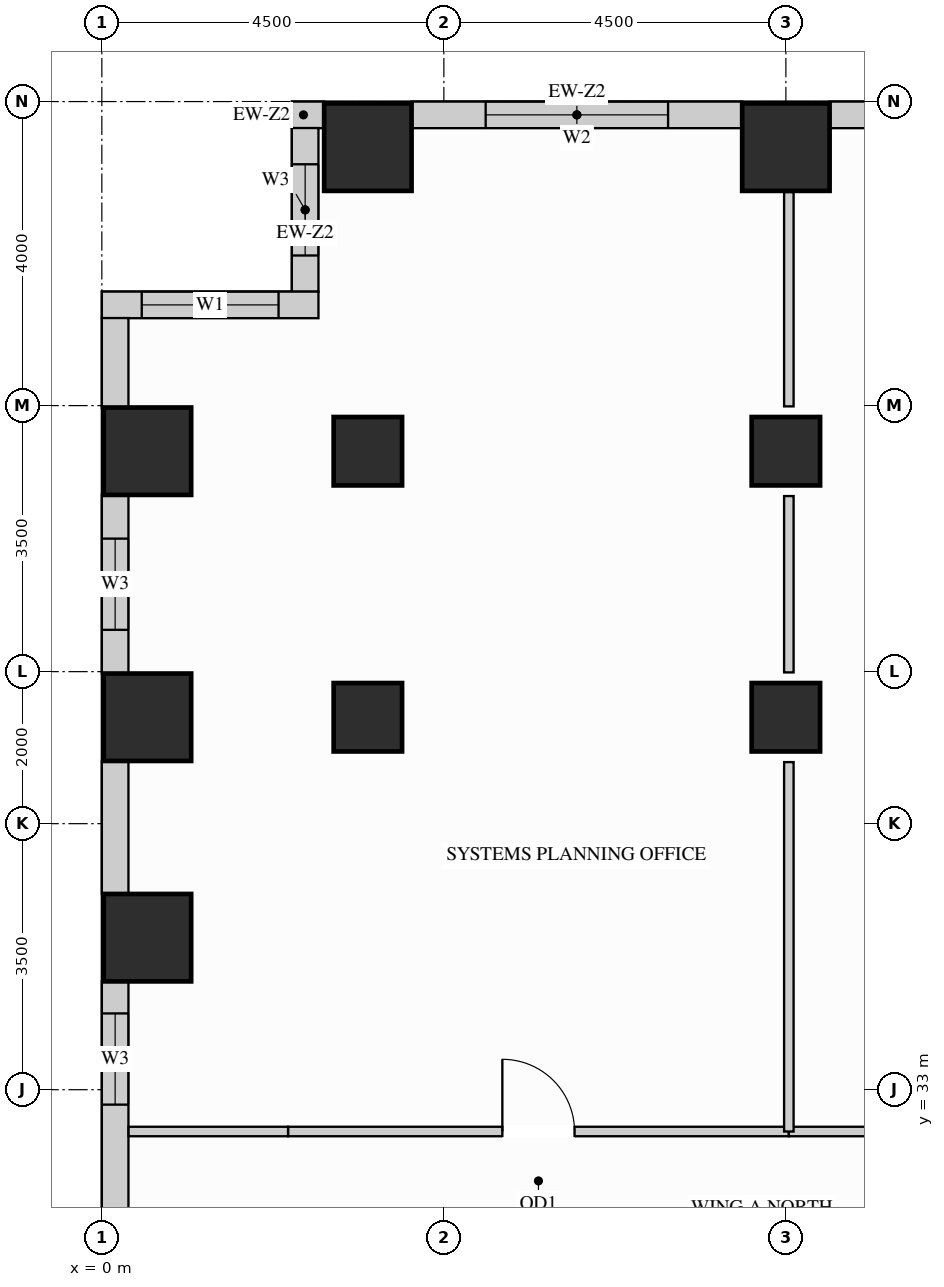
"""IFC4 building model, lengths in metres.
Left out: names, types, materials, properties, quantities, classifications, styles, units other than length and angle.
Written with IfcOpenShell. Run it as: python <this file> out.ifc"""

import sys

from ifc_helpers import new_model, si_unit, direction, frame, frame_2d, origin, origin_2d, place, context, subcontext, project, spatial, rectangle, extrude, source, transform, mapped, element, fill, save


model = new_model("IFC4")
c1 = context("Model", 3, precision=1e-05, world=origin(), true_north=direction((0.0, 1.0)))
c2 = subcontext(c1, "Body", "Model", "MODEL_VIEW")
j1 = project(units=[si_unit("LENGTHUNIT", "METRE"), si_unit("PLANEANGLEUNIT", "RADIAN")], contexts=[c1])
p1 = place(None, origin())
s1 = spatial("IfcSite", under=j1, at=p1, CompositionType="ELEMENT")
p2 = place(p1, origin())
s2 = spatial("IfcBuilding", under=s1, at=p2, CompositionType="ELEMENT")
p3 = place(p2, frame((0.0, 0.0, 131.4)))
s3 = spatial("IfcBuildingStorey", under=s2, at=p3, CompositionType="ELEMENT", Elevation=131.4)
m1 = source(origin(), c2, "Body", "SweptSolid", [
    extrude(rectangle(XDim=0.9, YDim=0.9, at=origin_2d()), origin(), (0.0, 0.0, 1.0), 3.38),
])
for number, where, z_axis, x_axis in (
    (1, (3.5, 37.9, 0.0), (0.0, 0.0, 1.0), (1.0, 0.0, 0.0)),
    (2, (3.5, 41.4, 0.0), (0.0, 0.0, 1.0), (1.0, 0.0, 0.0)),
    (3, (9.0, 37.9, 0.0), (0.0, 0.0, 1.0), (1.0, 0.0, 0.0)),
    (4, (9.0, 41.4, 0.0), (0.0, 0.0, 1.0), (1.0, 0.0, 0.0)),
):
    element("IfcColumn", number, at=place(p3, frame(where, z_axis=z_axis, x_axis=x_axis)), inside=s3, PredefinedType="COLUMN", context=c2, shape_type="MappedRepresentation", body=[
        mapped(m1, transform((0.0, 0.0, 0.0), x_axis=(1.0, 0.0, 0.0), y_axis=(0.0, 1.0, 0.0), z_axis=(0.0, 0.0, 1.0))),
    ])
m2 = source(origin(), c2, "Body", "SweptSolid", [
    extrude(rectangle(XDim=1.15, YDim=1.15, at=origin_2d()), origin(), (0.0, 0.0, 1.0), 3.38),
])
for number, where, z_axis, x_axis in (
    (5, (3.5, 45.4, 0.0), (0.0, 0.0, 1.0), (1.0, 0.0, 0.0)),
    (6, (9.0, 45.4, 0.0), (0.0, 0.0, 1.0), (1.0, 0.0, 0.0)),
    (7, (0.6, 35.0, 0.0), (0.0, 0.0, 1.0), (1.0, 0.0, 0.0)),
    (8, (0.6, 37.9, 0.0), (0.0, 0.0, 1.0), (1.0, 0.0, 0.0)),
    (9, (0.6, 41.4, 0.0), (0.0, 0.0, 1.0), (1.0, 0.0, 0.0)),
):
    element("IfcColumn", number, at=place(p3, frame(where, z_axis=z_axis, x_axis=x_axis)), inside=s3, PredefinedType="COLUMN", context=c2, shape_type="MappedRepresentation", body=[
        mapped(m2, transform((0.0, 0.0, 0.0), x_axis=(1.0, 0.0, 0.0), y_axis=(0.0, 1.0, 0.0), z_axis=(0.0, 0.0, 1.0))),
    ])
p4 = place(p3, frame((13.927, 45.825, 0.0), z_axis=(0.0, 0.0, 1.0), x_axis=(-1.0, 0.0, 0.0)))
e10 = element("IfcWall", 10, at=p4, inside=s3, PredefinedType="SOLIDWALL", context=c2, shape_type="SweptSolid", body=[
    extrude(rectangle(XDim=4.354, YDim=0.35, at=frame_2d((2.177, 0.0))), origin(), (0.0, 0.0, 1.0), 3.365),
])
p5 = place(p4, frame((0.977, 0.0, 0.78)))
e11 = element("IfcOpeningElement", 11, at=p5, cuts=e10, PredefinedType="OPENING", context=c2, shape_type="SweptSolid", body=[
    extrude(rectangle(XDim=2.4, YDim=2.1, at=frame_2d((1.2, 1.05))), frame((0.0, 0.185, 0.0), z_axis=(0.0, -1.0, 0.0), x_axis=(1.0, 0.0, 0.0)), (0.0, 0.0, 1.0), 0.37),
])
p6 = place(p3, frame((8.427, 45.825, 0.0), z_axis=(0.0, 0.0, 1.0), x_axis=(-1.0, 0.0, 0.0)))
e12 = element("IfcWall", 12, at=p6, inside=s3, PredefinedType="SOLIDWALL", context=c2, shape_type="SweptSolid", body=[
    extrude(rectangle(XDim=4.354, YDim=0.35, at=frame_2d((2.177, 0.0))), origin(), (0.0, 0.0, 1.0), 3.365),
])
p7 = place(p6, frame((0.977, 0.0, 0.78)))
e13 = element("IfcOpeningElement", 13, at=p7, cuts=e12, PredefinedType="OPENING", context=c2, shape_type="SweptSolid", body=[
    extrude(rectangle(XDim=2.4, YDim=2.1, at=frame_2d((1.2, 1.05))), frame((0.0, 0.185, 0.0), z_axis=(0.0, -1.0, 0.0), x_axis=(1.0, 0.0, 0.0)), (0.0, 0.0, 1.0), 0.37),
])
m3 = source(origin(), c2, "Body", "SweptSolid", [
    extrude(rectangle(XDim=0.427, YDim=0.35, at=frame_2d((0.213, 0.0))), origin(), (0.0, 0.0, 1.0), 3.365),
])
p8 = place(p3, frame((2.927, 45.825, 0.0), z_axis=(0.0, 0.0, 1.0), x_axis=(-1.0, 0.0, 0.0)))
e14 = element("IfcWall", 14, at=p8, inside=s3, PredefinedType="SOLIDWALL", context=c2, shape_type="MappedRepresentation", body=[
    mapped(m3, transform((0.0, 0.0, 0.0), x_axis=(1.0, 0.0, 0.0), y_axis=(0.0, 1.0, 0.0), z_axis=(0.0, 0.0, 1.0))),
])
p9 = place(p3, frame((2.675, 45.652, 0.0), z_axis=(0.0, 0.0, 1.0), x_axis=(0.0, -1.0, 0.0)))
e15 = element("IfcWall", 15, at=p9, inside=s3, PredefinedType="SOLIDWALL", context=c2, shape_type="SweptSolid", body=[
    extrude(rectangle(XDim=2.154, YDim=0.35, at=frame_2d((1.077, 0.0))), origin(), (0.0, 0.0, 1.0), 3.365),
])
p10 = place(p9, frame((0.477, 0.0, 0.78)))
e16 = element("IfcOpeningElement", 16, at=p10, cuts=e15, PredefinedType="OPENING", context=c2, shape_type="SweptSolid", body=[
    extrude(rectangle(XDim=1.2, YDim=2.1, at=frame_2d((0.6, 1.05))), frame((0.0, 0.185, 0.0), z_axis=(0.0, -1.0, 0.0), x_axis=(1.0, 0.0, 0.0)), (0.0, 0.0, 1.0), 0.37),
])
p11 = place(p3, frame((2.85, 43.325, 0.0), z_axis=(0.0, 0.0, 1.0), x_axis=(-1.0, 0.0, 0.0)))
e17 = element("IfcWall", 17, at=p11, inside=s3, PredefinedType="SOLIDWALL", context=c2, shape_type="SweptSolid", body=[
    extrude(rectangle(XDim=2.85, YDim=0.35, at=frame_2d((1.425, 0.0))), origin(), (0.0, 0.0, 1.0), 3.365),
])
p12 = place(p11, frame((0.525, 0.0, 0.78)))
e18 = element("IfcOpeningElement", 18, at=p12, cuts=e17, PredefinedType="OPENING", context=c2, shape_type="SweptSolid", body=[
    extrude(rectangle(XDim=1.8, YDim=2.1, at=frame_2d((0.9, 1.05))), frame((0.0, 0.185, 0.0), z_axis=(0.0, -1.0, 0.0), x_axis=(1.0, 0.0, 0.0)), (0.0, 0.0, 1.0), 0.37),
])
m4 = source(origin(), c2, "Body", "SweptSolid", [
    extrude(rectangle(XDim=1.179, YDim=0.35, at=frame_2d((0.59, 0.0))), origin(), (0.0, 0.0, 1.0), 3.365),
])
p13 = place(p3, frame((0.175, 43.152, 0.0), z_axis=(0.0, 0.0, 1.0), x_axis=(0.0, -1.0, 0.0)))
e19 = element("IfcWall", 19, at=p13, inside=s3, PredefinedType="SOLIDWALL", context=c2, shape_type="MappedRepresentation", body=[
    mapped(m4, transform((0.0, 0.0, 0.0), x_axis=(1.0, 0.0, 0.0), y_axis=(0.0, 1.0, 0.0), z_axis=(0.0, 0.0, 1.0))),
])
p14 = place(p3, frame((0.175, 40.827, 0.0), z_axis=(0.0, 0.0, 1.0), x_axis=(0.0, -1.0, 0.0)))
e20 = element("IfcWall", 20, at=p14, inside=s3, PredefinedType="SOLIDWALL", context=c2, shape_type="SweptSolid", body=[
    extrude(rectangle(XDim=2.354, YDim=0.35, at=frame_2d((1.177, 0.0))), origin(), (0.0, 0.0, 1.0), 3.365),
])
p15 = place(p14, frame((0.577, 0.0, 0.78)))
e21 = element("IfcOpeningElement", 21, at=p15, cuts=e20, PredefinedType="OPENING", context=c2, shape_type="SweptSolid", body=[
    extrude(rectangle(XDim=1.2, YDim=2.1, at=frame_2d((0.6, 1.05))), frame((0.0, 0.185, 0.0), z_axis=(0.0, -1.0, 0.0), x_axis=(1.0, 0.0, 0.0)), (0.0, 0.0, 1.0), 0.37),
])
m5 = source(origin(), c2, "Body", "SweptSolid", [
    extrude(rectangle(XDim=1.754, YDim=0.35, at=frame_2d((0.877, 0.0))), origin(), (0.0, 0.0, 1.0), 3.365),
])
p16 = place(p3, frame((0.175, 37.327, 0.0), z_axis=(0.0, 0.0, 1.0), x_axis=(0.0, -1.0, 0.0)))
e22 = element("IfcWall", 22, at=p16, inside=s3, PredefinedType="SOLIDWALL", context=c2, shape_type="MappedRepresentation", body=[
    mapped(m5, transform((0.0, 0.0, 0.0), x_axis=(1.0, 0.0, 0.0), y_axis=(0.0, 1.0, 0.0), z_axis=(0.0, 0.0, 1.0))),
])
p17 = place(p3, frame((0.175, 34.427, 0.0), z_axis=(0.0, 0.0, 1.0), x_axis=(0.0, -1.0, 0.0)))
e23 = element("IfcWall", 23, at=p17, inside=s3, PredefinedType="SOLIDWALL", context=c2, shape_type="SweptSolid", body=[
    extrude(rectangle(XDim=3.354, YDim=0.35, at=frame_2d((1.677, 0.0))), origin(), (0.0, 0.0, 1.0), 3.365),
])
p18 = place(p17, frame((0.424, 0.0, 0.78)))
e24 = element("IfcOpeningElement", 24, at=p18, cuts=e23, PredefinedType="OPENING", context=c2, shape_type="SweptSolid", body=[
    extrude(rectangle(XDim=1.2, YDim=2.1, at=frame_2d((0.6, 1.05))), frame((0.0, 0.185, 0.0), z_axis=(0.0, -1.0, 0.0), x_axis=(1.0, 0.0, 0.0)), (0.0, 0.0, 1.0), 0.37),
])
p19 = place(p3, frame((2.45, 32.45, 0.0), z_axis=(0.0, 0.0, 1.0), x_axis=(1.0, 0.0, 0.0)))
e25 = element("IfcWall", 25, at=p19, inside=s3, PredefinedType="PARTITIONING", context=c2, shape_type="SweptSolid", body=[
    extrude(rectangle(XDim=6.589, YDim=0.125, at=frame_2d((3.294, 0.0))), origin(), (0.0, 0.0, 1.0), 3.365),
])
p20 = place(p19, frame((2.82, 0.0, 0.0)))
e26 = element("IfcOpeningElement", 26, at=p20, cuts=e25, PredefinedType="OPENING", context=c2, shape_type="SweptSolid", body=[
    extrude(rectangle(XDim=0.95, YDim=2.15, at=frame_2d((0.475, 1.075))), frame((0.0, 0.073, 0.0), z_axis=(0.0, -1.0, 0.0), x_axis=(1.0, 0.0, 0.0)), (0.0, 0.0, 1.0), 0.145),
])
p21 = place(p3, frame((9.039, 32.45, 0.0), z_axis=(0.0, 0.0, 1.0), x_axis=(1.0, 0.0, 0.0)))
e27 = element("IfcWall", 27, at=p21, inside=s3, PredefinedType="PARTITIONING", context=c2, shape_type="SweptSolid", body=[
    extrude(rectangle(XDim=8.011, YDim=0.125, at=frame_2d((4.005, 0.0))), origin(), (0.0, 0.0, 1.0), 3.365),
])
p22 = place(p21, frame((3.531, 0.0, 0.0)))
e28 = element("IfcOpeningElement", 28, at=p22, cuts=e27, PredefinedType="OPENING", context=c2, shape_type="SweptSolid", body=[
    extrude(rectangle(XDim=0.95, YDim=2.15, at=frame_2d((0.475, 1.075))), frame((0.0, 0.073, 0.0), z_axis=(0.0, -1.0, 0.0), x_axis=(1.0, 0.0, 0.0)), (0.0, 0.0, 1.0), 0.145),
])
m6 = source(origin(), c2, "Body", "SweptSolid", [
    extrude(rectangle(XDim=2.098, YDim=0.125, at=frame_2d((1.049, 0.0))), origin(), (0.0, 0.0, 1.0), 3.365),
])
p23 = place(p3, frame((0.352, 32.45, 0.0), z_axis=(0.0, 0.0, 1.0), x_axis=(1.0, 0.0, 0.0)))
e29 = element("IfcWall", 29, at=p23, inside=s3, PredefinedType="PARTITIONING", context=c2, shape_type="MappedRepresentation", body=[
    mapped(m6, transform((0.0, 0.0, 0.0), x_axis=(1.0, 0.0, 0.0), y_axis=(0.0, 1.0, 0.0), z_axis=(0.0, 0.0, 1.0))),
])
m7 = source(origin(), c2, "Body", "SweptSolid", [
    extrude(rectangle(XDim=4.86, YDim=0.125, at=frame_2d((2.43, 0.0))), origin(), (0.0, 0.0, 1.0), 3.365),
])
p24 = place(p3, frame((9.039, 32.45, 0.0), z_axis=(0.0, 0.0, 1.0), x_axis=(0.0, 1.0, 0.0)))
e30 = element("IfcWall", 30, at=p24, inside=s3, PredefinedType="PARTITIONING", context=c2, shape_type="MappedRepresentation", body=[
    mapped(m7, transform((0.0, 0.0, 0.0), x_axis=(1.0, 0.0, 0.0), y_axis=(0.0, 1.0, 0.0), z_axis=(0.0, 0.0, 1.0))),
])
m8 = source(origin(), c2, "Body", "SweptSolid", [
    extrude(rectangle(XDim=2.32, YDim=0.125, at=frame_2d((1.16, 0.0))), origin(), (0.0, 0.0, 1.0), 2.677),
])
p25 = place(p3, frame((9.039, 38.49, 0.0), z_axis=(0.0, 0.0, 1.0), x_axis=(0.0, 1.0, 0.0)))
e31 = element("IfcWall", 31, at=p25, inside=s3, PredefinedType="PARTITIONING", context=c2, shape_type="MappedRepresentation", body=[
    mapped(m8, transform((0.0, 0.0, 0.0), x_axis=(1.0, 0.0, 0.0), y_axis=(0.0, 1.0, 0.0), z_axis=(0.0, 0.0, 1.0))),
])
m9 = source(origin(), c2, "Body", "SweptSolid", [
    extrude(rectangle(XDim=2.82, YDim=0.125, at=frame_2d((1.41, 0.0))), origin(), (0.0, 0.0, 1.0), 2.677),
])
p26 = place(p3, frame((9.039, 41.99, 0.0), z_axis=(0.0, 0.0, 1.0), x_axis=(0.0, 1.0, 0.0)))
e32 = element("IfcWall", 32, at=p26, inside=s3, PredefinedType="PARTITIONING", context=c2, shape_type="MappedRepresentation", body=[
    mapped(m9, transform((0.0, 0.0, 0.0), x_axis=(1.0, 0.0, 0.0), y_axis=(0.0, 1.0, 0.0), z_axis=(0.0, 0.0, 1.0))),
])
m10 = source(origin(), c2, "Body", "SweptSolid", [
    extrude(rectangle(XDim=0.95, YDim=2.15, at=frame_2d((0.475, 1.075))), frame((0.0, 0.025, 0.0), z_axis=(0.0, -1.0, 0.0), x_axis=(1.0, 0.0, 0.0)), (0.0, 0.0, 1.0), 0.05),
])
p27 = place(p20, origin())
e33 = element("IfcDoor", 33, at=p27, inside=s3, OperationType="SINGLE_SWING_LEFT", PredefinedType="DOOR", context=c2, shape_type="MappedRepresentation", body=[
    mapped(m10, transform((0.0, 0.0, 0.0), x_axis=(1.0, 0.0, 0.0), y_axis=(0.0, 1.0, 0.0), z_axis=(0.0, 0.0, 1.0))),
])
fill(e26, e33)
m11 = source(origin(), c2, "Body", "SweptSolid", [
    extrude(rectangle(XDim=1.8, YDim=2.1, at=frame_2d((0.9, 1.05))), frame((0.0, 0.03, 0.0), z_axis=(0.0, -1.0, 0.0), x_axis=(1.0, 0.0, 0.0)), (0.0, 0.0, 1.0), 0.06),
])
p28 = place(p12, origin())
e34 = element("IfcWindow", 34, at=p28, inside=s3, PartitioningType="SINGLE_PANEL", PredefinedType="WINDOW", context=c2, shape_type="MappedRepresentation", body=[
    mapped(m11, transform((0.0, 0.0, 0.0), x_axis=(1.0, 0.0, 0.0), y_axis=(0.0, 1.0, 0.0), z_axis=(0.0, 0.0, 1.0))),
])
fill(e18, e34)
m12 = source(origin(), c2, "Body", "SweptSolid", [
    extrude(rectangle(XDim=2.4, YDim=2.1, at=frame_2d((1.2, 1.05))), frame((0.0, 0.03, 0.0), z_axis=(0.0, -1.0, 0.0), x_axis=(1.0, 0.0, 0.0)), (0.0, 0.0, 1.0), 0.06),
])
p29 = place(p7, origin())
e35 = element("IfcWindow", 35, at=p29, inside=s3, PartitioningType="SINGLE_PANEL", PredefinedType="WINDOW", context=c2, shape_type="MappedRepresentation", body=[
    mapped(m12, transform((0.0, 0.0, 0.0), x_axis=(1.0, 0.0, 0.0), y_axis=(0.0, 1.0, 0.0), z_axis=(0.0, 0.0, 1.0))),
])
fill(e13, e35)
m13 = source(origin(), c2, "Body", "SweptSolid", [
    extrude(rectangle(XDim=1.2, YDim=2.1, at=frame_2d((0.6, 1.05))), frame((0.0, 0.03, 0.0), z_axis=(0.0, -1.0, 0.0), x_axis=(1.0, 0.0, 0.0)), (0.0, 0.0, 1.0), 0.06),
])
p30 = place(p10, origin())
e36 = element("IfcWindow", 36, at=p30, inside=s3, PartitioningType="SINGLE_PANEL", PredefinedType="WINDOW", context=c2, shape_type="MappedRepresentation", body=[
    mapped(m13, transform((0.0, 0.0, 0.0), x_axis=(1.0, 0.0, 0.0), y_axis=(0.0, 1.0, 0.0), z_axis=(0.0, 0.0, 1.0))),
])
fill(e16, e36)
p31 = place(p15, origin())
e37 = element("IfcWindow", 37, at=p31, inside=s3, PartitioningType="SINGLE_PANEL", PredefinedType="WINDOW", context=c2, shape_type="MappedRepresentation", body=[
    mapped(m13, transform((0.0, 0.0, 0.0), x_axis=(1.0, 0.0, 0.0), y_axis=(0.0, 1.0, 0.0), z_axis=(0.0, 0.0, 1.0))),
])
fill(e21, e37)
p32 = place(p18, origin())
e38 = element("IfcWindow", 38, at=p32, inside=s3, PartitioningType="SINGLE_PANEL", PredefinedType="WINDOW", context=c2, shape_type="MappedRepresentation", body=[
    mapped(m13, transform((0.0, 0.0, 0.0), x_axis=(1.0, 0.0, 0.0), y_axis=(0.0, 1.0, 0.0), z_axis=(0.0, 0.0, 1.0))),
])
fill(e24, e38)
save(model, sys.argv[1])
